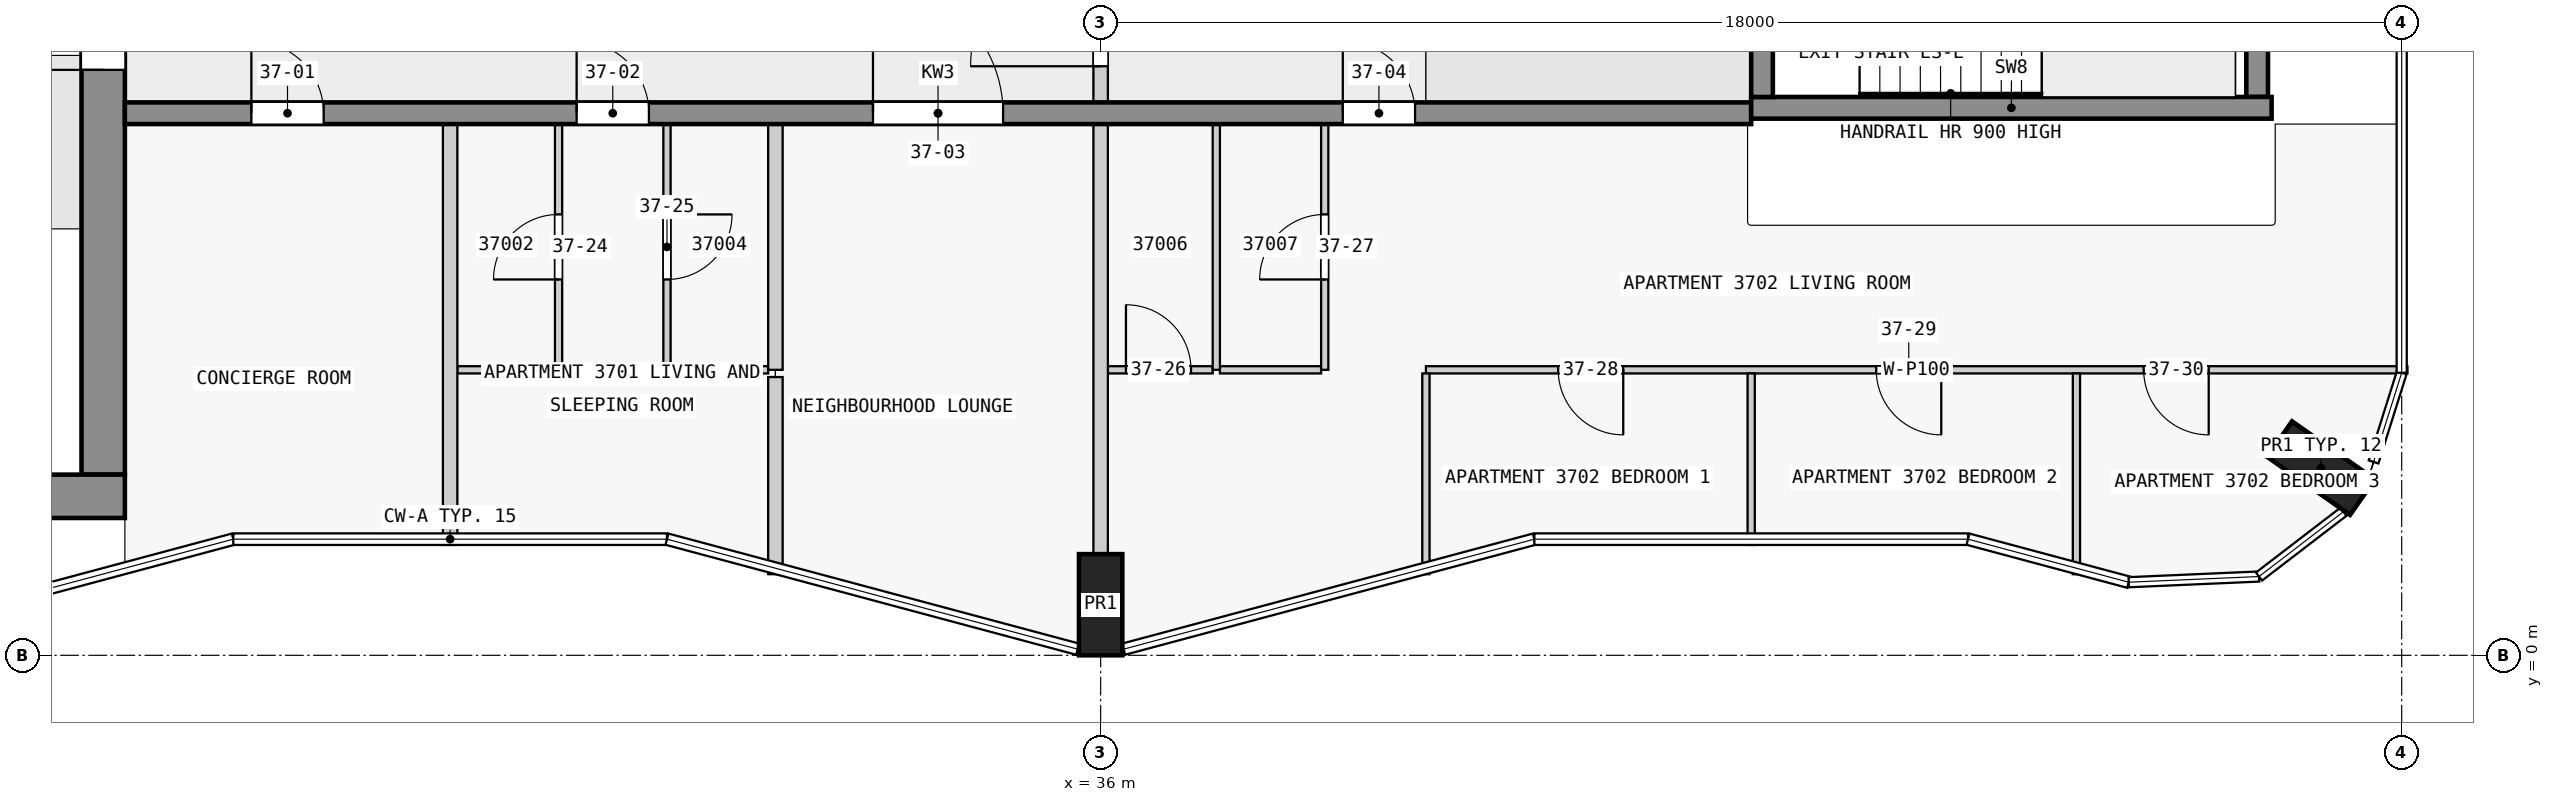
"""IFC4 building model, lengths in metres.
Left out: names, types, materials, properties, quantities, classifications, styles, units other than length and angle.
Written with IfcOpenShell. Run it as: python <this file> out.ifc"""

import sys

from ifc_helpers import new_model, si_unit, direction, frame, frame_2d, origin, origin_2d, place, context, subcontext, project, spatial, rectangle, extrude, element, fill, save


model = new_model("IFC4")
c1 = context("Model", 3, precision=1e-05, world=origin(), true_north=direction((0.0, 1.0)))
c2 = subcontext(c1, "Body", "Model", "MODEL_VIEW")
j1 = project(units=[si_unit("LENGTHUNIT", "METRE"), si_unit("PLANEANGLEUNIT", "RADIAN")], contexts=[c1])
p1 = place(None, origin())
s1 = spatial("IfcSite", under=j1, at=p1, CompositionType="ELEMENT")
p2 = place(p1, origin())
s2 = spatial("IfcBuilding", under=s1, at=p2, CompositionType="ELEMENT")
p3 = place(p2, frame((0.0, 0.0, 146.4)))
s3 = spatial("IfcBuildingStorey", under=s2, at=p3, CompositionType="ELEMENT", Elevation=146.4)
for number, where, z_axis, x_axis in (
    (1, (36.0, 0.7, 0.0), (0.0, 0.0, 1.0), (1.0, 0.0, 0.0)),
    (2, (52.884, 2.59, 0.0), (0.0, 0.0, 1.0), (0.574, 0.819, 0.0)),
):
    element("IfcColumn", number, at=place(p3, frame(where, z_axis=z_axis, x_axis=x_axis)), inside=s3, PredefinedType="COLUMN", context=c2, shape_type="SweptSolid", body=[
        extrude(rectangle(XDim=0.6, YDim=1.4, at=origin_2d()), origin(), (0.0, 0.0, 1.0), 3.5),
    ])
p4 = place(p3, frame((1.7, 2.2, 0.0), z_axis=(0.0, 0.0, 1.0), x_axis=(1.0, 0.0, 0.0)))
e3 = element("IfcWall", 3, at=p4, inside=s3, PredefinedType="SHEAR", context=c2, shape_type="SweptSolid", body=[
    extrude(rectangle(XDim=20.8, YDim=0.6, at=frame_2d((10.4, 0.0))), origin(), (0.0, 0.0, 1.0), 3.25),
])
p5 = place(p3, frame((22.2, 2.5, 0.0), z_axis=(0.0, 0.0, 1.0), x_axis=(0.0, 1.0, 0.0)))
e4 = element("IfcWall", 4, at=p5, inside=s3, PredefinedType="SHEAR", context=c2, shape_type="SweptSolid", body=[
    extrude(rectangle(XDim=14.9, YDim=0.6, at=frame_2d((7.45, 0.0))), origin(), (0.0, 0.0, 1.0), 3.25),
])
p6 = place(p5, frame((5.6, 0.0, 0.0)))
e5 = element("IfcOpeningElement", 5, at=p6, cuts=e4, PredefinedType="OPENING", context=c2, shape_type="SweptSolid", body=[
    extrude(rectangle(XDim=1.8, YDim=2.1, at=frame_2d((0.9, 1.05))), frame((0.0, 0.31, 0.0), z_axis=(0.0, -1.0, 0.0), x_axis=(1.0, 0.0, 0.0)), (0.0, 0.0, 1.0), 0.62),
])
p7 = place(p3, frame((45.15, 7.725, 0.0), z_axis=(0.0, 0.0, 1.0), x_axis=(0.0, 1.0, 0.0)))
e6 = element("IfcWall", 6, at=p7, inside=s3, PredefinedType="SHEAR", context=c2, shape_type="SweptSolid", body=[
    extrude(rectangle(XDim=2.55, YDim=0.3, at=frame_2d((1.275, 0.0))), origin(), (0.0, 0.0, 1.0), 3.5),
])
p8 = place(p7, frame((0.725, 0.0, 0.0)))
e7 = element("IfcOpeningElement", 7, at=p8, cuts=e6, PredefinedType="OPENING", context=c2, shape_type="SweptSolid", body=[
    extrude(rectangle(XDim=1.1, YDim=2.1, at=frame_2d((0.55, 1.05))), frame((0.0, 0.16, 0.0), z_axis=(0.0, -1.0, 0.0), x_axis=(1.0, 0.0, 0.0)), (0.0, 0.0, 1.0), 0.32),
])
p9 = place(p3, frame((52.0, 7.725, 0.0), z_axis=(0.0, 0.0, 1.0), x_axis=(0.0, 1.0, 0.0)))
e8 = element("IfcWall", 8, at=p9, inside=s3, PredefinedType="SHEAR", context=c2, shape_type="SweptSolid", body=[
    extrude(rectangle(XDim=2.55, YDim=0.3, at=frame_2d((1.275, 0.0))), origin(), (0.0, 0.0, 1.0), 3.5),
])
p10 = place(p3, frame((45.0, 7.575, 0.0), z_axis=(0.0, 0.0, 1.0), x_axis=(1.0, 0.0, 0.0)))
e9 = element("IfcWall", 9, at=p10, inside=s3, PredefinedType="SHEAR", context=c2, shape_type="SweptSolid", body=[
    extrude(rectangle(XDim=7.2, YDim=0.3, at=frame_2d((3.6, 0.0))), origin(), (0.0, 0.0, 1.0), 3.5),
])
p11 = place(p3, frame((22.5, 7.5, 0.0), z_axis=(0.0, 0.0, 1.0), x_axis=(1.0, 0.0, 0.0)))
e10 = element("IfcWall", 10, at=p11, inside=s3, PredefinedType="SHEAR", context=c2, shape_type="SweptSolid", body=[
    extrude(rectangle(XDim=22.5, YDim=0.3, at=frame_2d((11.25, 0.0))), origin(), (0.0, 0.0, 1.0), 3.25),
])
p12 = place(p11, frame((1.75, 0.0, 0.0)))
e11 = element("IfcOpeningElement", 11, at=p12, cuts=e10, PredefinedType="OPENING", context=c2, shape_type="SweptSolid", body=[
    extrude(rectangle(XDim=1.0, YDim=2.1, at=frame_2d((0.5, 1.05))), frame((0.0, 0.16, 0.0), z_axis=(0.0, -1.0, 0.0), x_axis=(1.0, 0.0, 0.0)), (0.0, 0.0, 1.0), 0.32),
])
p13 = place(p11, frame((6.25, 0.0, 0.0)))
e12 = element("IfcOpeningElement", 12, at=p13, cuts=e10, PredefinedType="OPENING", context=c2, shape_type="SweptSolid", body=[
    extrude(rectangle(XDim=1.0, YDim=2.1, at=frame_2d((0.5, 1.05))), frame((0.0, 0.16, 0.0), z_axis=(0.0, -1.0, 0.0), x_axis=(1.0, 0.0, 0.0)), (0.0, 0.0, 1.0), 0.32),
])
p14 = place(p11, frame((10.35, 0.0, 0.0)))
e13 = element("IfcOpeningElement", 13, at=p14, cuts=e10, PredefinedType="OPENING", context=c2, shape_type="SweptSolid", body=[
    extrude(rectangle(XDim=1.8, YDim=2.1, at=frame_2d((0.9, 1.05))), frame((0.0, 0.16, 0.0), z_axis=(0.0, -1.0, 0.0), x_axis=(1.0, 0.0, 0.0)), (0.0, 0.0, 1.0), 0.32),
])
p15 = place(p11, frame((16.85, 0.0, 0.0)))
e14 = element("IfcOpeningElement", 14, at=p15, cuts=e10, PredefinedType="OPENING", context=c2, shape_type="SweptSolid", body=[
    extrude(rectangle(XDim=1.0, YDim=2.1, at=frame_2d((0.5, 1.05))), frame((0.0, 0.16, 0.0), z_axis=(0.0, -1.0, 0.0), x_axis=(1.0, 0.0, 0.0)), (0.0, 0.0, 1.0), 0.32),
])
p16 = place(p3, frame((54.08, 3.95, 0.0), z_axis=(0.0, 0.0, 1.0), x_axis=(-1.0, 0.0, 0.0)))
e15 = element("IfcWall", 15, at=p16, inside=s3, PredefinedType="PARTITIONING", context=c2, shape_type="SweptSolid", body=[
    extrude(rectangle(XDim=13.58, YDim=0.1, at=frame_2d((6.79, 0.0))), origin(), (0.0, 0.0, 1.0), 3.25),
])
p17 = place(p16, frame((10.85, 0.0, 0.0)))
e16 = element("IfcOpeningElement", 16, at=p17, cuts=e15, PredefinedType="OPENING", context=c2, shape_type="SweptSolid", body=[
    extrude(rectangle(XDim=0.9, YDim=2.1, at=frame_2d((0.45, 1.05))), frame((0.0, 0.06, 0.0), z_axis=(0.0, -1.0, 0.0), x_axis=(1.0, 0.0, 0.0)), (0.0, 0.0, 1.0), 0.12),
])
p18 = place(p16, frame((6.45, 0.0, 0.0)))
e17 = element("IfcOpeningElement", 17, at=p18, cuts=e15, PredefinedType="OPENING", context=c2, shape_type="SweptSolid", body=[
    extrude(rectangle(XDim=0.9, YDim=2.1, at=frame_2d((0.45, 1.05))), frame((0.0, 0.06, 0.0), z_axis=(0.0, -1.0, 0.0), x_axis=(1.0, 0.0, 0.0)), (0.0, 0.0, 1.0), 0.12),
])
p19 = place(p16, frame((2.75, 0.0, 0.0)))
e18 = element("IfcOpeningElement", 18, at=p19, cuts=e15, PredefinedType="OPENING", context=c2, shape_type="SweptSolid", body=[
    extrude(rectangle(XDim=0.9, YDim=2.1, at=frame_2d((0.45, 1.05))), frame((0.0, 0.06, 0.0), z_axis=(0.0, -1.0, 0.0), x_axis=(1.0, 0.0, 0.0)), (0.0, 0.0, 1.0), 0.12),
])
for number, where, z_axis, x_axis in (
    (19, (27.1, 3.95, 0.0), (0.0, 0.0, 1.0), (1.0, 0.0, 0.0)),
    (20, (30.05, 3.95, 0.0), (0.0, 0.0, 1.0), (1.0, 0.0, 0.0)),
):
    element("IfcWall", number, at=place(p3, frame(where, z_axis=z_axis, x_axis=x_axis)), inside=s3, PredefinedType="PARTITIONING", context=c2, shape_type="SweptSolid", body=[
        extrude(rectangle(XDim=1.35, YDim=0.1, at=frame_2d((0.675, 0.0))), origin(), (0.0, 0.0, 1.0), 3.25),
    ])
p20 = place(p3, frame((36.1, 3.95, 0.0), z_axis=(0.0, 0.0, 1.0), x_axis=(1.0, 0.0, 0.0)))
e21 = element("IfcWall", 21, at=p20, inside=s3, PredefinedType="PARTITIONING", context=c2, shape_type="SweptSolid", body=[
    extrude(rectangle(XDim=1.45, YDim=0.1, at=frame_2d((0.725, 0.0))), origin(), (0.0, 0.0, 1.0), 3.25),
])
p21 = place(p20, frame((0.25, 0.0, 0.0)))
e22 = element("IfcOpeningElement", 22, at=p21, cuts=e21, PredefinedType="OPENING", context=c2, shape_type="SweptSolid", body=[
    extrude(rectangle(XDim=0.9, YDim=2.1, at=frame_2d((0.45, 1.05))), frame((0.0, 0.06, 0.0), z_axis=(0.0, -1.0, 0.0), x_axis=(1.0, 0.0, 0.0)), (0.0, 0.0, 1.0), 0.12),
])
p22 = place(p3, frame((37.65, 3.95, 0.0), z_axis=(0.0, 0.0, 1.0), x_axis=(1.0, 0.0, 0.0)))
e23 = element("IfcWall", 23, at=p22, inside=s3, PredefinedType="PARTITIONING", context=c2, shape_type="SweptSolid", body=[
    extrude(rectangle(XDim=1.4, YDim=0.1, at=frame_2d((0.7, 0.0))), origin(), (0.0, 0.0, 1.0), 3.25),
])
p23 = place(p3, frame((27.0, 1.527, 0.0), z_axis=(0.0, 0.0, 1.0), x_axis=(0.0, 1.0, 0.0)))
e24 = element("IfcWall", 24, at=p23, inside=s3, PredefinedType="PARTITIONING", context=c2, shape_type="SweptSolid", body=[
    extrude(rectangle(XDim=5.823, YDim=0.2, at=frame_2d((2.912, 0.0))), origin(), (0.0, 0.0, 1.0), 3.25),
])
p24 = place(p3, frame((28.5, 3.95, 0.0), z_axis=(0.0, 0.0, 1.0), x_axis=(0.0, 1.0, 0.0)))
e25 = element("IfcWall", 25, at=p24, inside=s3, PredefinedType="PARTITIONING", context=c2, shape_type="SweptSolid", body=[
    extrude(rectangle(XDim=3.4, YDim=0.1, at=frame_2d((1.7, 0.0))), origin(), (0.0, 0.0, 1.0), 3.25),
])
p25 = place(p24, frame((1.25, 0.0, 0.0)))
e26 = element("IfcOpeningElement", 26, at=p25, cuts=e25, PredefinedType="OPENING", context=c2, shape_type="SweptSolid", body=[
    extrude(rectangle(XDim=0.9, YDim=2.1, at=frame_2d((0.45, 1.05))), frame((0.0, 0.06, 0.0), z_axis=(0.0, -1.0, 0.0), x_axis=(1.0, 0.0, 0.0)), (0.0, 0.0, 1.0), 0.12),
])
p26 = place(p3, frame((30.0, 7.35, 0.0), z_axis=(0.0, 0.0, 1.0), x_axis=(0.0, -1.0, 0.0)))
e27 = element("IfcWall", 27, at=p26, inside=s3, PredefinedType="PARTITIONING", context=c2, shape_type="SweptSolid", body=[
    extrude(rectangle(XDim=3.4, YDim=0.1, at=frame_2d((1.7, 0.0))), origin(), (0.0, 0.0, 1.0), 3.25),
])
p27 = place(p26, frame((1.25, 0.0, 0.0)))
e28 = element("IfcOpeningElement", 28, at=p27, cuts=e27, PredefinedType="OPENING", context=c2, shape_type="SweptSolid", body=[
    extrude(rectangle(XDim=0.9, YDim=2.1, at=frame_2d((0.45, 1.05))), frame((0.0, 0.06, 0.0), z_axis=(0.0, -1.0, 0.0), x_axis=(1.0, 0.0, 0.0)), (0.0, 0.0, 1.0), 0.12),
])
p28 = place(p3, frame((31.5, 3.85, 0.0), z_axis=(0.0, 0.0, 1.0), x_axis=(0.0, -1.0, 0.0)))
e29 = element("IfcWall", 29, at=p28, inside=s3, PredefinedType="PARTITIONING", context=c2, shape_type="SweptSolid", body=[
    extrude(rectangle(XDim=2.728, YDim=0.2, at=frame_2d((1.364, 0.0))), origin(), (0.0, 0.0, 1.0), 3.25),
])
p29 = place(p3, frame((31.5, 3.95, 0.0), z_axis=(0.0, 0.0, 1.0), x_axis=(0.0, 1.0, 0.0)))
e30 = element("IfcWall", 30, at=p29, inside=s3, PredefinedType="PARTITIONING", context=c2, shape_type="SweptSolid", body=[
    extrude(rectangle(XDim=3.4, YDim=0.2, at=frame_2d((1.7, 0.0))), origin(), (0.0, 0.0, 1.0), 3.25),
])
p30 = place(p3, frame((36.0, 1.4, 0.0), z_axis=(0.0, 0.0, 1.0), x_axis=(0.0, 1.0, 0.0)))
e31 = element("IfcWall", 31, at=p30, inside=s3, PredefinedType="PARTITIONING", context=c2, shape_type="SweptSolid", body=[
    extrude(rectangle(XDim=5.95, YDim=0.2, at=frame_2d((2.975, 0.0))), origin(), (0.0, 0.0, 1.0), 3.25),
])
p31 = place(p3, frame((37.6, 3.95, 0.0), z_axis=(0.0, 0.0, 1.0), x_axis=(0.0, 1.0, 0.0)))
e32 = element("IfcWall", 32, at=p31, inside=s3, PredefinedType="PARTITIONING", context=c2, shape_type="SweptSolid", body=[
    extrude(rectangle(XDim=3.4, YDim=0.1, at=frame_2d((1.7, 0.0))), origin(), (0.0, 0.0, 1.0), 3.25),
])
p32 = place(p3, frame((39.1, 3.95, 0.0), z_axis=(0.0, 0.0, 1.0), x_axis=(0.0, 1.0, 0.0)))
e33 = element("IfcWall", 33, at=p32, inside=s3, PredefinedType="PARTITIONING", context=c2, shape_type="SweptSolid", body=[
    extrude(rectangle(XDim=3.4, YDim=0.1, at=frame_2d((1.7, 0.0))), origin(), (0.0, 0.0, 1.0), 3.25),
])
p33 = place(p32, frame((1.25, 0.0, 0.0)))
e34 = element("IfcOpeningElement", 34, at=p33, cuts=e33, PredefinedType="OPENING", context=c2, shape_type="SweptSolid", body=[
    extrude(rectangle(XDim=0.9, YDim=2.1, at=frame_2d((0.45, 1.05))), frame((0.0, 0.06, 0.0), z_axis=(0.0, -1.0, 0.0), x_axis=(1.0, 0.0, 0.0)), (0.0, 0.0, 1.0), 0.12),
])
p34 = place(p3, frame((40.5, 3.9, 0.0), z_axis=(0.0, 0.0, 1.0), x_axis=(0.0, -1.0, 0.0)))
e35 = element("IfcWall", 35, at=p34, inside=s3, PredefinedType="PARTITIONING", context=c2, shape_type="SweptSolid", body=[
    extrude(rectangle(XDim=2.778, YDim=0.1, at=frame_2d((1.389, 0.0))), origin(), (0.0, 0.0, 1.0), 3.25),
])
p35 = place(p3, frame((45.0, 1.527, 0.0), z_axis=(0.0, 0.0, 1.0), x_axis=(0.0, 1.0, 0.0)))
e36 = element("IfcWall", 36, at=p35, inside=s3, PredefinedType="PARTITIONING", context=c2, shape_type="SweptSolid", body=[
    extrude(rectangle(XDim=2.373, YDim=0.1, at=frame_2d((1.187, 0.0))), origin(), (0.0, 0.0, 1.0), 3.25),
])
p36 = place(p3, frame((49.5, 1.122, 0.0), z_axis=(0.0, 0.0, 1.0), x_axis=(0.0, 1.0, 0.0)))
e37 = element("IfcWall", 37, at=p36, inside=s3, PredefinedType="PARTITIONING", context=c2, shape_type="SweptSolid", body=[
    extrude(rectangle(XDim=2.778, YDim=0.1, at=frame_2d((1.389, 0.0))), origin(), (0.0, 0.0, 1.0), 3.25),
])
p37 = place(p3, frame((36.0, 7.45, 0.0), z_axis=(0.0, 0.0, 1.0), x_axis=(0.0, 1.0, 0.0)))
e38 = element("IfcWall", 38, at=p37, inside=s3, PredefinedType="PARTITIONING", context=c2, shape_type="SweptSolid", body=[
    extrude(rectangle(XDim=3.1, YDim=0.2, at=frame_2d((1.55, 0.0))), origin(), (0.0, 0.0, 1.0), 3.25),
])
p38 = place(p37, frame((0.7, 0.0, 0.0)))
e39 = element("IfcOpeningElement", 39, at=p38, cuts=e38, PredefinedType="OPENING", context=c2, shape_type="SweptSolid", body=[
    extrude(rectangle(XDim=1.8, YDim=2.1, at=frame_2d((0.9, 1.05))), frame((0.0, 0.11, 0.0), z_axis=(0.0, -1.0, 0.0), x_axis=(1.0, 0.0, 0.0)), (0.0, 0.0, 1.0), 0.22),
])
p39 = place(p6, origin())
e40 = element("IfcDoor", 40, at=p39, inside=s3, OperationType="DOUBLE_DOOR_SINGLE_SWING", PredefinedType="DOOR", context=c2, shape_type="SweptSolid", body=[
    extrude(rectangle(XDim=1.8, YDim=2.1, at=frame_2d((0.9, 1.05))), frame((0.0, 0.025, 0.0), z_axis=(0.0, -1.0, 0.0), x_axis=(1.0, 0.0, 0.0)), (0.0, 0.0, 1.0), 0.05),
])
fill(e5, e40)
p40 = place(p12, origin())
e41 = element("IfcDoor", 41, at=p40, inside=s3, OperationType="SINGLE_SWING_LEFT", PredefinedType="DOOR", context=c2, shape_type="SweptSolid", body=[
    extrude(rectangle(XDim=1.0, YDim=2.1, at=frame_2d((0.5, 1.05))), frame((0.0, 0.025, 0.0), z_axis=(0.0, -1.0, 0.0), x_axis=(1.0, 0.0, 0.0)), (0.0, 0.0, 1.0), 0.05),
])
fill(e11, e41)
p41 = place(p13, origin())
e42 = element("IfcDoor", 42, at=p41, inside=s3, OperationType="SINGLE_SWING_LEFT", PredefinedType="DOOR", context=c2, shape_type="SweptSolid", body=[
    extrude(rectangle(XDim=1.0, YDim=2.1, at=frame_2d((0.5, 1.05))), frame((0.0, 0.025, 0.0), z_axis=(0.0, -1.0, 0.0), x_axis=(1.0, 0.0, 0.0)), (0.0, 0.0, 1.0), 0.05),
])
fill(e12, e42)
p42 = place(p14, origin())
e43 = element("IfcDoor", 43, at=p42, inside=s3, OperationType="SINGLE_SWING_LEFT", PredefinedType="DOOR", context=c2, shape_type="SweptSolid", body=[
    extrude(rectangle(XDim=1.8, YDim=2.1, at=frame_2d((0.9, 1.05))), frame((0.0, 0.025, 0.0), z_axis=(0.0, -1.0, 0.0), x_axis=(1.0, 0.0, 0.0)), (0.0, 0.0, 1.0), 0.05),
])
fill(e13, e43)
p43 = place(p15, origin())
e44 = element("IfcDoor", 44, at=p43, inside=s3, OperationType="SINGLE_SWING_RIGHT", PredefinedType="DOOR", context=c2, shape_type="SweptSolid", body=[
    extrude(rectangle(XDim=1.0, YDim=2.1, at=frame_2d((0.5, 1.05))), frame((0.0, 0.025, 0.0), z_axis=(0.0, -1.0, 0.0), x_axis=(1.0, 0.0, 0.0)), (0.0, 0.0, 1.0), 0.05),
])
fill(e14, e44)
p44 = place(p38, origin())
e45 = element("IfcDoor", 45, at=p44, inside=s3, OperationType="SINGLE_SWING_RIGHT", PredefinedType="DOOR", context=c2, shape_type="SweptSolid", body=[
    extrude(rectangle(XDim=1.8, YDim=2.1, at=frame_2d((0.9, 1.05))), frame((0.0, 0.025, 0.0), z_axis=(0.0, -1.0, 0.0), x_axis=(1.0, 0.0, 0.0)), (0.0, 0.0, 1.0), 0.05),
])
fill(e39, e45)
p45 = place(p25, origin())
e46 = element("IfcDoor", 46, at=p45, inside=s3, OperationType="SINGLE_SWING_RIGHT", PredefinedType="DOOR", context=c2, shape_type="SweptSolid", body=[
    extrude(rectangle(XDim=0.9, YDim=2.1, at=frame_2d((0.45, 1.05))), frame((0.0, 0.025, 0.0), z_axis=(0.0, -1.0, 0.0), x_axis=(1.0, 0.0, 0.0)), (0.0, 0.0, 1.0), 0.05),
])
fill(e26, e46)
p46 = place(p27, origin())
e47 = element("IfcDoor", 47, at=p46, inside=s3, OperationType="SINGLE_SWING_RIGHT", PredefinedType="DOOR", context=c2, shape_type="SweptSolid", body=[
    extrude(rectangle(XDim=0.9, YDim=2.1, at=frame_2d((0.45, 1.05))), frame((0.0, 0.025, 0.0), z_axis=(0.0, -1.0, 0.0), x_axis=(1.0, 0.0, 0.0)), (0.0, 0.0, 1.0), 0.05),
])
fill(e28, e47)
p47 = place(p21, origin())
e48 = element("IfcDoor", 48, at=p47, inside=s3, OperationType="SINGLE_SWING_LEFT", PredefinedType="DOOR", context=c2, shape_type="SweptSolid", body=[
    extrude(rectangle(XDim=0.9, YDim=2.1, at=frame_2d((0.45, 1.05))), frame((0.0, 0.025, 0.0), z_axis=(0.0, -1.0, 0.0), x_axis=(1.0, 0.0, 0.0)), (0.0, 0.0, 1.0), 0.05),
])
fill(e22, e48)
p48 = place(p33, origin())
e49 = element("IfcDoor", 49, at=p48, inside=s3, OperationType="SINGLE_SWING_RIGHT", PredefinedType="DOOR", context=c2, shape_type="SweptSolid", body=[
    extrude(rectangle(XDim=0.9, YDim=2.1, at=frame_2d((0.45, 1.05))), frame((0.0, 0.025, 0.0), z_axis=(0.0, -1.0, 0.0), x_axis=(1.0, 0.0, 0.0)), (0.0, 0.0, 1.0), 0.05),
])
fill(e34, e49)
p49 = place(p17, origin())
e50 = element("IfcDoor", 50, at=p49, inside=s3, OperationType="SINGLE_SWING_RIGHT", PredefinedType="DOOR", context=c2, shape_type="SweptSolid", body=[
    extrude(rectangle(XDim=0.9, YDim=2.1, at=frame_2d((0.45, 1.05))), frame((0.0, 0.025, 0.0), z_axis=(0.0, -1.0, 0.0), x_axis=(1.0, 0.0, 0.0)), (0.0, 0.0, 1.0), 0.05),
])
fill(e16, e50)
p50 = place(p18, origin())
e51 = element("IfcDoor", 51, at=p50, inside=s3, OperationType="SINGLE_SWING_RIGHT", PredefinedType="DOOR", context=c2, shape_type="SweptSolid", body=[
    extrude(rectangle(XDim=0.9, YDim=2.1, at=frame_2d((0.45, 1.05))), frame((0.0, 0.025, 0.0), z_axis=(0.0, -1.0, 0.0), x_axis=(1.0, 0.0, 0.0)), (0.0, 0.0, 1.0), 0.05),
])
fill(e17, e51)
p51 = place(p19, origin())
e52 = element("IfcDoor", 52, at=p51, inside=s3, OperationType="SINGLE_SWING_LEFT", PredefinedType="DOOR", context=c2, shape_type="SweptSolid", body=[
    extrude(rectangle(XDim=0.9, YDim=2.1, at=frame_2d((0.45, 1.05))), frame((0.0, 0.025, 0.0), z_axis=(0.0, -1.0, 0.0), x_axis=(1.0, 0.0, 0.0)), (0.0, 0.0, 1.0), 0.05),
])
fill(e18, e52)
save(model, sys.argv[1])
